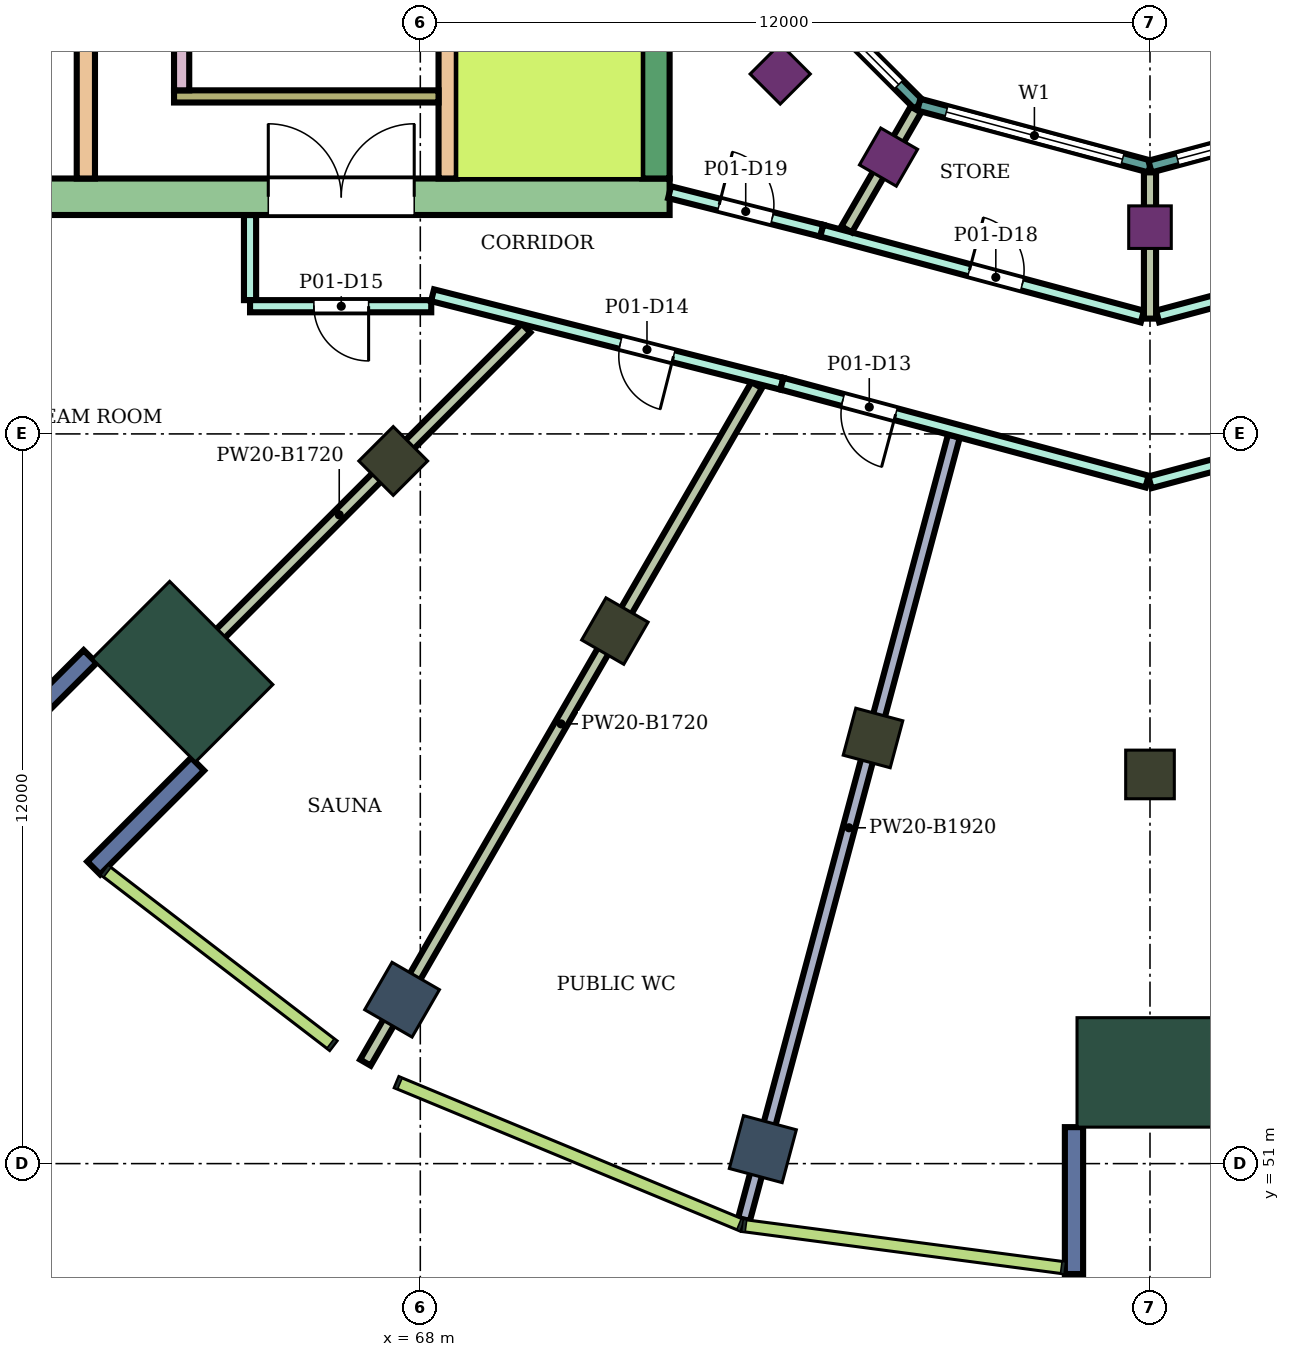
"""IFC4 building model, lengths in metres.
Left out: names, types, materials, properties, quantities, classifications, styles, units other than length and angle.
Written with IfcOpenShell. Run it as: python <this file> out.ifc"""

import sys

from ifc_helpers import new_model, si_unit, direction, frame, frame_2d, origin, origin_2d, place, context, subcontext, project, spatial, rectangle, extrude, element, fill, save


model = new_model("IFC4")
c1 = context("Model", 3, precision=1e-05, world=origin(), true_north=direction((0.0, 1.0)))
c2 = subcontext(c1, "Body", "Model", "MODEL_VIEW")
j1 = project(units=[si_unit("LENGTHUNIT", "METRE"), si_unit("PLANEANGLEUNIT", "RADIAN")], contexts=[c1])
p1 = place(None, origin())
s1 = spatial("IfcSite", under=j1, at=p1, CompositionType="ELEMENT")
p2 = place(p1, origin())
s2 = spatial("IfcBuilding", under=s1, at=p2, CompositionType="ELEMENT")
p3 = place(p2, frame((0.0, 0.0, 270.9)))
s3 = spatial("IfcBuildingStorey", under=s2, at=p3, CompositionType="ELEMENT", Elevation=270.9)
for number, where, z_axis, x_axis in (
    (1, (67.7, 53.696, 0.0), (0.0, 0.0, 1.0), (-0.5, -0.866, 0.0)),
    (2, (73.633, 51.238, 0.0), (0.0, 0.0, 1.0), (-0.259, -0.966, 0.0)),
):
    element("IfcColumn", number, at=place(p3, frame(where, z_axis=z_axis, x_axis=x_axis)), inside=s3, PredefinedType="COLUMN", context=c2, shape_type="SweptSolid", body=[
        extrude(rectangle(XDim=0.9, YDim=0.9, at=origin_2d()), origin(), (0.0, 0.0, 1.0), 4.8),
    ])
for number, where, z_axis, x_axis in (
    (3, (67.555, 62.555, 0.0), (0.0, 0.0, 1.0), (-0.707, -0.707, 0.0)),
    (4, (71.2, 59.758, 0.0), (0.0, 0.0, 1.0), (-0.5, -0.866, 0.0)),
    (5, (75.445, 58.0, 0.0), (0.0, 0.0, 1.0), (-0.259, -0.966, 0.0)),
    (6, (80.0, 57.4, 0.0), (0.0, 0.0, 1.0), (0.0, -1.0, 0.0)),
):
    element("IfcColumn", number, at=place(p3, frame(where, z_axis=z_axis, x_axis=x_axis)), inside=s3, PredefinedType="COLUMN", context=c2, shape_type="SweptSolid", body=[
        extrude(rectangle(XDim=0.8, YDim=0.8, at=origin_2d()), origin(), (0.0, 0.0, 1.0), 4.8),
    ])
for number, where, z_axis, x_axis in (
    (7, (73.919, 68.919, 0.0), (0.0, 0.0, 1.0), (-0.707, -0.707, 0.0)),
    (8, (75.7, 67.552, 0.0), (0.0, 0.0, 1.0), (-0.5, -0.866, 0.0)),
    (9, (80.0, 66.4, 0.0), (0.0, 0.0, 1.0), (0.0, -1.0, 0.0)),
):
    element("IfcColumn", number, at=place(p3, frame(where, z_axis=z_axis, x_axis=x_axis)), inside=s3, PredefinedType="COLUMN", context=c2, shape_type="SweptSolid", body=[
        extrude(rectangle(XDim=0.7, YDim=0.7, at=origin_2d()), origin(), (0.0, 0.0, 1.0), 4.8),
    ])
for number, where, z_axis, x_axis in (
    (10, (64.09, 59.09, 0.0), (0.0, 0.0, 1.0), (-0.707, -0.707, 0.0)),
    (11, (80.0, 52.5, 0.0), (0.0, 0.0, 1.0), (0.0, -1.0, 0.0)),
):
    element("IfcColumn", number, at=place(p3, frame(where, z_axis=z_axis, x_axis=x_axis)), inside=s3, PredefinedType="COLUMN", context=c2, shape_type="SweptSolid", body=[
        extrude(rectangle(XDim=1.8, YDim=2.4, at=origin_2d()), origin(), (0.0, 0.0, 1.0), 4.8),
    ])
p4 = place(p3, frame((72.1, 66.9, 0.0), z_axis=(0.0, 0.0, 1.0), x_axis=(-1.0, 0.0, 0.0)))
e12 = element("IfcWall", 12, at=p4, inside=s3, PredefinedType="SHEAR", context=c2, shape_type="SweptSolid", body=[
    extrude(rectangle(XDim=14.9, YDim=0.6, at=frame_2d((7.45, 0.0))), origin(), (0.0, 0.0, 1.0), 4.48),
])
p5 = place(p4, frame((4.2, 0.0, 0.0)))
e13 = element("IfcOpeningElement", 13, at=p5, cuts=e12, PredefinedType="OPENING", context=c2, shape_type="SweptSolid", body=[
    extrude(rectangle(XDim=2.4, YDim=2.4, at=frame_2d((1.2, 1.2))), frame((0.0, 0.31, 0.0), z_axis=(0.0, -1.0, 0.0), x_axis=(1.0, 0.0, 0.0)), (0.0, 0.0, 1.0), 0.62),
])
p6 = place(p3, frame((71.875, 75.0, 0.0), z_axis=(0.0, 0.0, 1.0), x_axis=(0.0, -1.0, 0.0)))
e14 = element("IfcWall", 14, at=p6, inside=s3, PredefinedType="SHEAR", context=c2, shape_type="SweptSolid", body=[
    extrude(rectangle(XDim=7.8, YDim=0.45, at=frame_2d((3.9, 0.0))), origin(), (0.0, 0.0, 1.0), 4.48),
])
p7 = place(p3, frame((68.45, 75.0, 0.0), z_axis=(0.0, 0.0, 1.0), x_axis=(0.0, -1.0, 0.0)))
e15 = element("IfcWall", 15, at=p7, inside=s3, PredefinedType="SHEAR", context=c2, shape_type="SweptSolid", body=[
    extrude(rectangle(XDim=7.8, YDim=0.3, at=frame_2d((3.9, 0.0))), origin(), (0.0, 0.0, 1.0), 4.48),
])
p8 = place(p7, frame((1.85, 0.0, 0.0)))
e16 = element("IfcOpeningElement", 16, at=p8, cuts=e15, PredefinedType="OPENING", context=c2, shape_type="SweptSolid", body=[
    extrude(rectangle(XDim=0.9, YDim=2.1, at=frame_2d((0.45, 1.05))), frame((0.0, 0.16, 0.0), z_axis=(0.0, -1.0, 0.0), x_axis=(1.0, 0.0, 0.0)), (0.0, 0.0, 1.0), 0.32),
])
p9 = place(p3, frame((68.3, 68.55, 0.0), z_axis=(0.0, 0.0, 1.0), x_axis=(-1.0, 0.0, 0.0)))
e17 = element("IfcWall", 17, at=p9, inside=s3, PredefinedType="SHEAR", context=c2, shape_type="SweptSolid", body=[
    extrude(rectangle(XDim=4.35, YDim=0.2, at=frame_2d((2.175, 0.0))), origin(), (0.0, 0.0, 1.0), 4.48),
])
p10 = place(p3, frame((64.075, 71.45, 0.0), z_axis=(0.0, 0.0, 1.0), x_axis=(0.0, -1.0, 0.0)))
e18 = element("IfcWall", 18, at=p10, inside=s3, PredefinedType="SHEAR", context=c2, shape_type="SweptSolid", body=[
    extrude(rectangle(XDim=2.8, YDim=0.25, at=frame_2d((1.4, 0.0))), origin(), (0.0, 0.0, 1.0), 4.48),
])
p11 = place(p10, frame((0.95, 0.0, 0.0)))
e19 = element("IfcOpeningElement", 19, at=p11, cuts=e18, PredefinedType="OPENING", context=c2, shape_type="SweptSolid", body=[
    extrude(rectangle(XDim=0.9, YDim=2.1, at=frame_2d((0.45, 1.05))), frame((0.0, 0.135, 0.0), z_axis=(0.0, -1.0, 0.0), x_axis=(1.0, 0.0, 0.0)), (0.0, 0.0, 1.0), 0.27),
])
p12 = place(p3, frame((62.5, 71.4, 0.0), z_axis=(0.0, 0.0, 1.0), x_axis=(0.0, -1.0, 0.0)))
e20 = element("IfcWall", 20, at=p12, inside=s3, PredefinedType="SHEAR", context=c2, shape_type="SweptSolid", body=[
    extrude(rectangle(XDim=4.2, YDim=0.3, at=frame_2d((2.1, 0.0))), origin(), (0.0, 0.0, 1.0), 4.48),
])
for number, where, z_axis, x_axis in (
    (21, (62.57, 59.338, 0.0), (0.0, 0.0, 1.0), (-0.707, -0.707, 0.0)),
    (22, (64.338, 57.57, 0.0), (0.0, 0.0, 1.0), (-0.707, -0.707, 0.0)),
    (23, (78.75, 51.6, 0.0), (0.0, 0.0, 1.0), (0.0, -1.0, 0.0)),
):
    element("IfcWall", number, at=place(p3, frame(where, z_axis=z_axis, x_axis=x_axis)), inside=s3, PredefinedType="NOTDEFINED", context=c2, shape_type="SweptSolid", body=[
        extrude(rectangle(XDim=2.416, YDim=0.3, at=frame_2d((1.208, 0.0))), origin(), (0.0, 0.0, 1.0), 4.8),
    ])
p13 = place(p3, frame((73.415, 71.198, 0.0), z_axis=(0.0, 0.0, 1.0), x_axis=(0.707106781187, -0.707106781187, 0.0)))
e24 = element("IfcWall", 24, at=p13, inside=s3, PredefinedType="NOTDEFINED", context=c2, shape_type="SweptSolid", body=[
    extrude(rectangle(XDim=3.936, YDim=0.2, at=frame_2d((1.968, 0.0))), origin(), (0.0, 0.0, 1.0), 4.8),
])
p14 = place(p13, frame((0.468, 0.0, 0.9)))
e25 = element("IfcOpeningElement", 25, at=p14, cuts=e24, PredefinedType="OPENING", context=c2, shape_type="SweptSolid", body=[
    extrude(rectangle(XDim=3.0, YDim=2.3, at=frame_2d((1.5, 1.15))), frame((0.0, 0.11, 0.0), z_axis=(0.0, -1.0, 0.0), x_axis=(1.0, 0.0, 0.0)), (0.0, 0.0, 1.0), 0.22),
])
p15 = place(p3, frame((76.198, 68.415, 0.0), z_axis=(0.0, 0.0, 1.0), x_axis=(0.965933654434, -0.258789828301, 0.0)))
e26 = element("IfcWall", 26, at=p15, inside=s3, PredefinedType="NOTDEFINED", context=c2, shape_type="SweptSolid", body=[
    extrude(rectangle(XDim=3.936, YDim=0.2, at=frame_2d((1.968, 0.0))), origin(), (0.0, 0.0, 1.0), 4.8),
])
p16 = place(p15, frame((0.468, 0.0, 0.9)))
e27 = element("IfcOpeningElement", 27, at=p16, cuts=e26, PredefinedType="OPENING", context=c2, shape_type="SweptSolid", body=[
    extrude(rectangle(XDim=3.0, YDim=2.3, at=frame_2d((1.5, 1.15))), frame((0.0, 0.11, 0.0), z_axis=(0.0, -1.0, 0.0), x_axis=(1.0, 0.0, 0.0)), (0.0, 0.0, 1.0), 0.22),
])
p17 = place(p3, frame((80.0, 67.396, 0.0), z_axis=(0.0, 0.0, 1.0), x_axis=(0.965933654434, 0.258789828301, 0.0)))
e28 = element("IfcWall", 28, at=p17, inside=s3, PredefinedType="NOTDEFINED", context=c2, shape_type="SweptSolid", body=[
    extrude(rectangle(XDim=3.936, YDim=0.2, at=frame_2d((1.968, 0.0))), origin(), (0.0, 0.0, 1.0), 4.8),
])
p18 = place(p17, frame((0.468, 0.0, 0.9)))
e29 = element("IfcOpeningElement", 29, at=p18, cuts=e28, PredefinedType="OPENING", context=c2, shape_type="SweptSolid", body=[
    extrude(rectangle(XDim=3.0, YDim=2.3, at=frame_2d((1.5, 1.15))), frame((0.0, 0.11, 0.0), z_axis=(0.0, -1.0, 0.0), x_axis=(1.0, 0.0, 0.0)), (0.0, 0.0, 1.0), 0.22),
])
p19 = place(p3, frame((63.594, 58.597, 0.0), z_axis=(0.0, 0.0, 1.0), x_axis=(0.707162972126, 0.707050585782, 0.0)))
e30 = element("IfcWall", 30, at=p19, inside=s3, PredefinedType="PARTITIONING", context=c2, shape_type="SweptSolid", body=[
    extrude(rectangle(XDim=8.689, YDim=0.2, at=frame_2d((4.345, 0.0))), origin(), (0.0, 0.0, 1.0), 3.08),
])
p20 = place(p3, frame((65.2, 65.2, 0.0), z_axis=(0.0, 0.0, 1.0), x_axis=(0.0, 1.0, 0.0)))
e31 = element("IfcWall", 31, at=p20, inside=s3, PredefinedType="PARTITIONING", context=c2, shape_type="SweptSolid", body=[
    extrude(rectangle(XDim=1.399, YDim=0.2, at=frame_2d((0.7, 0.0))), origin(), (0.0, 0.0, 1.0), 4.35),
])
p21 = place(p3, frame((65.2, 65.1, 0.0), z_axis=(0.0, 0.0, 1.0), x_axis=(1.0, 0.0, 0.0)))
e32 = element("IfcWall", 32, at=p21, inside=s3, PredefinedType="PARTITIONING", context=c2, shape_type="SweptSolid", body=[
    extrude(rectangle(XDim=2.98, YDim=0.2, at=frame_2d((1.49, 0.0))), origin(), (0.0, 0.0, 1.0), 4.35),
])
p22 = place(p21, frame((1.05, 0.0, 0.0)))
e33 = element("IfcOpeningElement", 33, at=p22, cuts=e32, PredefinedType="OPENING", context=c2, shape_type="SweptSolid", body=[
    extrude(rectangle(XDim=0.9, YDim=2.1, at=frame_2d((0.45, 1.05))), frame((0.0, 0.11, 0.0), z_axis=(0.0, -1.0, 0.0), x_axis=(1.0, 0.0, 0.0)), (0.0, 0.0, 1.0), 0.22),
])
p23 = place(p3, frame((67.097, 52.661, 0.0), z_axis=(0.0, 0.0, 1.0), x_axis=(0.500128690501, 0.865951091539, 0.0)))
e34 = element("IfcWall", 34, at=p23, inside=s3, PredefinedType="PARTITIONING", context=c2, shape_type="SweptSolid", body=[
    extrude(rectangle(XDim=12.866, YDim=0.2, at=frame_2d((6.433, 0.0))), origin(), (0.0, 0.0, 1.0), 3.08),
])
p24 = place(p3, frame((68.201, 65.28, 0.0), z_axis=(0.0, 0.0, 1.0), x_axis=(0.969376914413, -0.245577681811, 0.0)))
e35 = element("IfcWall", 35, at=p24, inside=s3, PredefinedType="PARTITIONING", context=c2, shape_type="SweptSolid", body=[
    extrude(rectangle(XDim=5.927, YDim=0.2, at=frame_2d((2.963, 0.0))), origin(), (0.0, 0.0, 1.0), 4.35),
])
p25 = place(p24, frame((3.188, 0.0, 0.0)))
e36 = element("IfcOpeningElement", 36, at=p25, cuts=e35, PredefinedType="OPENING", context=c2, shape_type="SweptSolid", body=[
    extrude(rectangle(XDim=0.9, YDim=2.1, at=frame_2d((0.45, 1.05))), frame((0.0, 0.11, 0.0), z_axis=(0.0, -1.0, 0.0), x_axis=(1.0, 0.0, 0.0)), (0.0, 0.0, 1.0), 0.22),
])
p26 = place(p3, frame((72.1, 66.975, 0.0), z_axis=(0.0, 0.0, 1.0), x_axis=(0.969471314457, -0.245204752086, 0.0)))
e37 = element("IfcWall", 37, at=p26, inside=s3, PredefinedType="PARTITIONING", context=c2, shape_type="SweptSolid", body=[
    extrude(rectangle(XDim=2.582, YDim=0.2, at=frame_2d((1.291, 0.0))), origin(), (0.0, 0.0, 1.0), 4.35),
])
p27 = place(p26, frame((0.841, 0.0, 0.0)))
e38 = element("IfcOpeningElement", 38, at=p27, cuts=e37, PredefinedType="OPENING", context=c2, shape_type="SweptSolid", body=[
    extrude(rectangle(XDim=0.9, YDim=2.1, at=frame_2d((0.45, 1.05))), frame((0.0, 0.11, 0.0), z_axis=(0.0, -1.0, 0.0), x_axis=(1.0, 0.0, 0.0)), (0.0, 0.0, 1.0), 0.22),
])
p28 = place(p3, frame((73.323, 50.082, 0.0), z_axis=(0.0, 0.0, 1.0), x_axis=(0.25885533734, 0.965916101083, 0.0)))
e39 = element("IfcWall", 39, at=p28, inside=s3, PredefinedType="PARTITIONING", context=c2, shape_type="SweptSolid", body=[
    extrude(rectangle(XDim=13.337, YDim=0.2, at=frame_2d((6.668, 0.0))), origin(), (0.0, 0.0, 1.0), 2.88),
])
p29 = place(p3, frame((73.947, 63.826, 0.0), z_axis=(0.0, 0.0, 1.0), x_axis=(0.965898432367, -0.258921258979, 0.0)))
e40 = element("IfcWall", 40, at=p29, inside=s3, PredefinedType="PARTITIONING", context=c2, shape_type="SweptSolid", body=[
    extrude(rectangle(XDim=6.217, YDim=0.2, at=frame_2d((3.108, 0.0))), origin(), (0.0, 0.0, 1.0), 4.35),
])
p30 = place(p29, frame((1.037, 0.0, 0.0)))
e41 = element("IfcOpeningElement", 41, at=p30, cuts=e40, PredefinedType="OPENING", context=c2, shape_type="SweptSolid", body=[
    extrude(rectangle(XDim=0.9, YDim=2.1, at=frame_2d((0.45, 1.05))), frame((0.0, 0.11, 0.0), z_axis=(0.0, -1.0, 0.0), x_axis=(1.0, 0.0, 0.0)), (0.0, 0.0, 1.0), 0.22),
])
p31 = place(p3, frame((74.603, 66.342, 0.0), z_axis=(0.0, 0.0, 1.0), x_axis=(0.965920893652, -0.258837453254, 0.0)))
e42 = element("IfcWall", 42, at=p31, inside=s3, PredefinedType="PARTITIONING", context=c2, shape_type="SweptSolid", body=[
    extrude(rectangle(XDim=5.458, YDim=0.2, at=frame_2d((2.729, 0.0))), origin(), (0.0, 0.0, 1.0), 4.35),
])
p32 = place(p31, frame((2.512, 0.0, 0.0)))
e43 = element("IfcOpeningElement", 43, at=p32, cuts=e42, PredefinedType="OPENING", context=c2, shape_type="SweptSolid", body=[
    extrude(rectangle(XDim=0.9, YDim=2.1, at=frame_2d((0.45, 1.05))), frame((0.0, 0.11, 0.0), z_axis=(0.0, -1.0, 0.0), x_axis=(1.0, 0.0, 0.0)), (0.0, 0.0, 1.0), 0.22),
])
p33 = place(p3, frame((75.011, 66.364, 0.0), z_axis=(0.0, 0.0, 1.0), x_axis=(0.500097042406, 0.865969369075, 0.0)))
e44 = element("IfcWall", 44, at=p33, inside=s3, PredefinedType="PARTITIONING", context=c2, shape_type="SweptSolid", body=[
    extrude(rectangle(XDim=2.275, YDim=0.2, at=frame_2d((1.138, 0.0))), origin(), (0.0, 0.0, 1.0), 3.08),
])
p34 = place(p3, frame((80.125, 64.932, 0.0), z_axis=(0.0, 0.0, 1.0), x_axis=(0.966236955806, 0.257655089674, 0.0)))
e45 = element("IfcWall", 45, at=p34, inside=s3, PredefinedType="PARTITIONING", context=c2, shape_type="SweptSolid", body=[
    extrude(rectangle(XDim=8.039, YDim=0.2, at=frame_2d((4.02, 0.0))), origin(), (0.0, 0.0, 1.0), 4.35),
])
p35 = place(p34, frame((6.298, 0.0, 0.0)))
e46 = element("IfcOpeningElement", 46, at=p35, cuts=e45, PredefinedType="OPENING", context=c2, shape_type="SweptSolid", body=[
    extrude(rectangle(XDim=0.9, YDim=2.1, at=frame_2d((0.45, 1.05))), frame((0.0, 0.11, 0.0), z_axis=(0.0, -1.0, 0.0), x_axis=(1.0, 0.0, 0.0)), (0.0, 0.0, 1.0), 0.22),
])
p36 = place(p34, frame((2.045, 0.0, 0.0)))
e47 = element("IfcOpeningElement", 47, at=p36, cuts=e45, PredefinedType="OPENING", context=c2, shape_type="SweptSolid", body=[
    extrude(rectangle(XDim=0.9, YDim=2.1, at=frame_2d((0.45, 1.05))), frame((0.0, 0.11, 0.0), z_axis=(0.0, -1.0, 0.0), x_axis=(1.0, 0.0, 0.0)), (0.0, 0.0, 1.0), 0.22),
])
p37 = place(p3, frame((80.0, 62.204, 0.0), z_axis=(0.0, 0.0, 1.0), x_axis=(0.965938139786, 0.258773086132, 0.0)))
e48 = element("IfcWall", 48, at=p37, inside=s3, PredefinedType="PARTITIONING", context=c2, shape_type="SweptSolid", body=[
    extrude(rectangle(XDim=6.266, YDim=0.2, at=frame_2d((3.133, 0.0))), origin(), (0.0, 0.0, 1.0), 4.35),
])
p38 = place(p37, frame((2.233, 0.0, 0.0)))
e49 = element("IfcOpeningElement", 49, at=p38, cuts=e48, PredefinedType="OPENING", context=c2, shape_type="SweptSolid", body=[
    extrude(rectangle(XDim=1.8, YDim=2.1, at=frame_2d((0.9, 1.05))), frame((0.0, 0.11, 0.0), z_axis=(0.0, -1.0, 0.0), x_axis=(1.0, 0.0, 0.0)), (0.0, 0.0, 1.0), 0.22),
])
p39 = place(p3, frame((80.0, 64.896, 0.0), z_axis=(0.0, 0.0, 1.0), x_axis=(0.0, 1.0, 0.0)))
e50 = element("IfcWall", 50, at=p39, inside=s3, PredefinedType="PARTITIONING", context=c2, shape_type="SweptSolid", body=[
    extrude(rectangle(XDim=2.405, YDim=0.2, at=frame_2d((1.203, 0.0))), origin(), (0.0, 0.0, 1.0), 3.08),
])
p40 = place(p14, origin())
e51 = element("IfcWindow", 51, at=p40, inside=s3, PartitioningType="SINGLE_PANEL", PredefinedType="WINDOW", context=c2, shape_type="SweptSolid", body=[
    extrude(rectangle(XDim=3.0, YDim=2.3, at=frame_2d((1.5, 1.15))), frame((0.0, 0.03, 0.0), z_axis=(0.0, -1.0, 0.0), x_axis=(1.0, 0.0, 0.0)), (0.0, 0.0, 1.0), 0.06),
])
fill(e25, e51)
p41 = place(p16, origin())
e52 = element("IfcWindow", 52, at=p41, inside=s3, PartitioningType="SINGLE_PANEL", PredefinedType="WINDOW", context=c2, shape_type="SweptSolid", body=[
    extrude(rectangle(XDim=3.0, YDim=2.3, at=frame_2d((1.5, 1.15))), frame((0.0, 0.03, 0.0), z_axis=(0.0, -1.0, 0.0), x_axis=(1.0, 0.0, 0.0)), (0.0, 0.0, 1.0), 0.06),
])
fill(e27, e52)
p42 = place(p18, origin())
e53 = element("IfcWindow", 53, at=p42, inside=s3, PartitioningType="SINGLE_PANEL", PredefinedType="WINDOW", context=c2, shape_type="SweptSolid", body=[
    extrude(rectangle(XDim=3.0, YDim=2.3, at=frame_2d((1.5, 1.15))), frame((0.0, 0.03, 0.0), z_axis=(0.0, -1.0, 0.0), x_axis=(1.0, 0.0, 0.0)), (0.0, 0.0, 1.0), 0.06),
])
fill(e29, e53)
p43 = place(p30, frame((0.9, 0.0, 0.0), z_axis=(0.0, 0.0, 1.0), x_axis=(-1.0, 0.0, 0.0)))
e54 = element("IfcDoor", 54, at=p43, inside=s3, OperationType="SINGLE_SWING_LEFT", PredefinedType="DOOR", context=c2, shape_type="SweptSolid", body=[
    extrude(rectangle(XDim=0.9, YDim=2.1, at=frame_2d((0.45, 1.05))), frame((0.0, 0.025, 0.0), z_axis=(0.0, -1.0, 0.0), x_axis=(1.0, 0.0, 0.0)), (0.0, 0.0, 1.0), 0.05),
])
fill(e41, e54)
p44 = place(p25, frame((0.9, 0.0, 0.0), z_axis=(0.0, 0.0, 1.0), x_axis=(-1.0, 0.0, 0.0)))
e55 = element("IfcDoor", 55, at=p44, inside=s3, OperationType="SINGLE_SWING_LEFT", PredefinedType="DOOR", context=c2, shape_type="SweptSolid", body=[
    extrude(rectangle(XDim=0.9, YDim=2.1, at=frame_2d((0.45, 1.05))), frame((0.0, 0.025, 0.0), z_axis=(0.0, -1.0, 0.0), x_axis=(1.0, 0.0, 0.0)), (0.0, 0.0, 1.0), 0.05),
])
fill(e36, e55)
p45 = place(p22, frame((0.9, 0.0, 0.0), z_axis=(0.0, 0.0, 1.0), x_axis=(-1.0, 0.0, 0.0)))
e56 = element("IfcDoor", 56, at=p45, inside=s3, OperationType="SINGLE_SWING_LEFT", PredefinedType="DOOR", context=c2, shape_type="SweptSolid", body=[
    extrude(rectangle(XDim=0.9, YDim=2.1, at=frame_2d((0.45, 1.05))), frame((0.0, 0.025, 0.0), z_axis=(0.0, -1.0, 0.0), x_axis=(1.0, 0.0, 0.0)), (0.0, 0.0, 1.0), 0.05),
])
fill(e33, e56)
p46 = place(p32, origin())
e57 = element("IfcDoor", 57, at=p46, inside=s3, OperationType="SINGLE_SWING_LEFT", PredefinedType="DOOR", context=c2, shape_type="SweptSolid", body=[
    extrude(rectangle(XDim=0.9, YDim=2.1, at=frame_2d((0.45, 1.05))), frame((0.0, 0.025, 0.0), z_axis=(0.0, -1.0, 0.0), x_axis=(1.0, 0.0, 0.0)), (0.0, 0.0, 1.0), 0.05),
])
fill(e43, e57)
p47 = place(p27, origin())
e58 = element("IfcDoor", 58, at=p47, inside=s3, OperationType="SINGLE_SWING_LEFT", PredefinedType="DOOR", context=c2, shape_type="SweptSolid", body=[
    extrude(rectangle(XDim=0.9, YDim=2.1, at=frame_2d((0.45, 1.05))), frame((0.0, 0.025, 0.0), z_axis=(0.0, -1.0, 0.0), x_axis=(1.0, 0.0, 0.0)), (0.0, 0.0, 1.0), 0.05),
])
fill(e38, e58)
p48 = place(p5, frame((2.4, 0.0, 0.0), z_axis=(0.0, 0.0, 1.0), x_axis=(-1.0, 0.0, 0.0)))
e59 = element("IfcDoor", 59, at=p48, inside=s3, OperationType="DOUBLE_DOOR_SINGLE_SWING", PredefinedType="DOOR", context=c2, shape_type="SweptSolid", body=[
    extrude(rectangle(XDim=2.4, YDim=2.4, at=frame_2d((1.2, 1.2))), frame((0.0, 0.025, 0.0), z_axis=(0.0, -1.0, 0.0), x_axis=(1.0, 0.0, 0.0)), (0.0, 0.0, 1.0), 0.05),
])
fill(e13, e59)
save(model, sys.argv[1])
